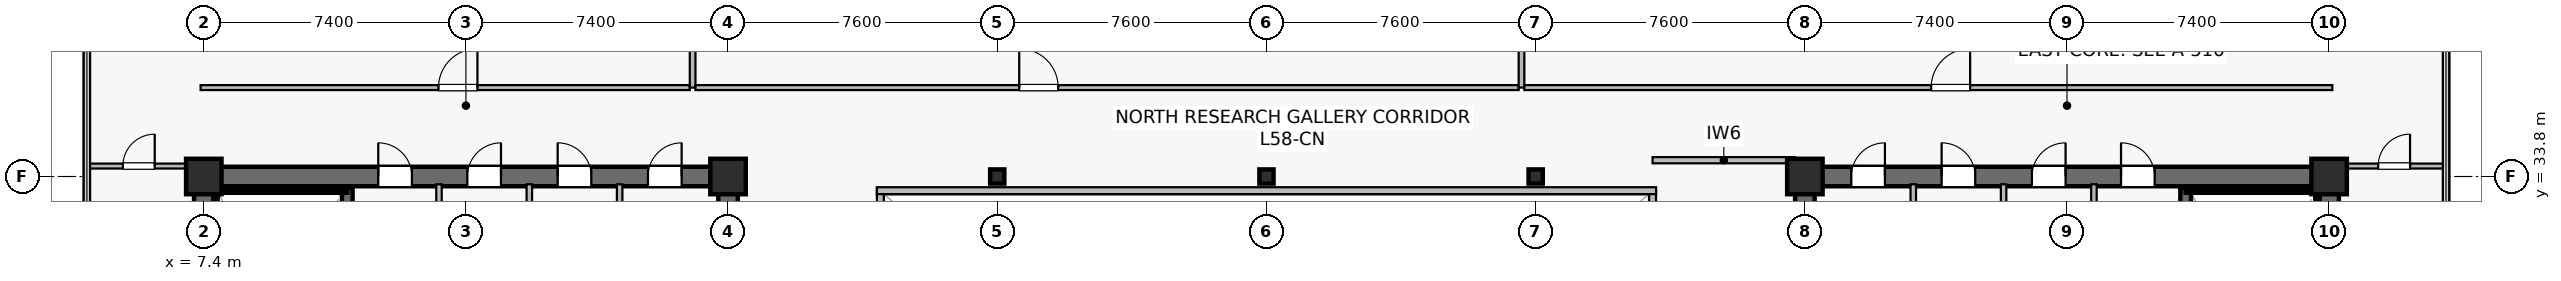
"""IFC4 building model, lengths in metres.
Left out: names, types, materials, properties, quantities, classifications, styles, units other than length and angle.
Written with IfcOpenShell. Run it as: python <this file> out.ifc"""

import sys

from ifc_helpers import new_model, si_unit, direction, frame, frame_2d, origin, origin_2d, place, context, subcontext, project, spatial, rectangle, hollow_rectangle, extrude, source, transform, mapped, element, fill, save


model = new_model("IFC4")
c1 = context("Model", 3, precision=1e-05, world=origin(), true_north=direction((0.0, 1.0)))
c2 = subcontext(c1, "Body", "Model", "MODEL_VIEW")
j1 = project(units=[si_unit("LENGTHUNIT", "METRE"), si_unit("PLANEANGLEUNIT", "RADIAN")], contexts=[c1])
p1 = place(None, origin())
s1 = spatial("IfcSite", under=j1, at=p1, CompositionType="ELEMENT")
p2 = place(p1, origin())
s2 = spatial("IfcBuilding", under=s1, at=p2, CompositionType="ELEMENT")
p3 = place(p2, frame((0.0, 0.0, 242.4)))
s3 = spatial("IfcBuildingStorey", under=s2, at=p3, CompositionType="ELEMENT", Elevation=242.4)
p4 = place(p3, frame((7.125, 33.8, 0.0), z_axis=(0.0, 0.0, 1.0), x_axis=(1.0, 0.0, 0.0)))
e1 = element("IfcWall", 1, at=p4, inside=s3, PredefinedType="SHEAR", context=c2, shape_type="SweptSolid", body=[
    extrude(rectangle(XDim=15.35, YDim=0.55, at=frame_2d((7.675, 0.0))), origin(), (0.0, 0.0, 1.0), 3.8),
])
p5 = place(p4, frame((5.2, 0.0, 0.0)))
e2 = element("IfcOpeningElement", 2, at=p5, cuts=e1, PredefinedType="OPENING", context=c2, shape_type="SweptSolid", body=[
    extrude(rectangle(XDim=0.95, YDim=2.15, at=frame_2d((0.475, 1.075))), frame((0.0, 0.285, 0.0), z_axis=(0.0, -1.0, 0.0), x_axis=(1.0, 0.0, 0.0)), (0.0, 0.0, 1.0), 0.57),
])
p6 = place(p4, frame((7.715, 0.0, 0.0)))
e3 = element("IfcOpeningElement", 3, at=p6, cuts=e1, PredefinedType="OPENING", context=c2, shape_type="SweptSolid", body=[
    extrude(rectangle(XDim=0.95, YDim=2.15, at=frame_2d((0.475, 1.075))), frame((0.0, 0.285, 0.0), z_axis=(0.0, -1.0, 0.0), x_axis=(1.0, 0.0, 0.0)), (0.0, 0.0, 1.0), 0.57),
])
p7 = place(p4, frame((10.265, 0.0, 0.0)))
e4 = element("IfcOpeningElement", 4, at=p7, cuts=e1, PredefinedType="OPENING", context=c2, shape_type="SweptSolid", body=[
    extrude(rectangle(XDim=0.95, YDim=2.15, at=frame_2d((0.475, 1.075))), frame((0.0, 0.285, 0.0), z_axis=(0.0, -1.0, 0.0), x_axis=(1.0, 0.0, 0.0)), (0.0, 0.0, 1.0), 0.57),
])
p8 = place(p4, frame((12.815, 0.0, 0.0)))
e5 = element("IfcOpeningElement", 5, at=p8, cuts=e1, PredefinedType="OPENING", context=c2, shape_type="SweptSolid", body=[
    extrude(rectangle(XDim=0.95, YDim=2.15, at=frame_2d((0.475, 1.075))), frame((0.0, 0.285, 0.0), z_axis=(0.0, -1.0, 0.0), x_axis=(1.0, 0.0, 0.0)), (0.0, 0.0, 1.0), 0.57),
])
p9 = place(p3, frame((7.4, 15.075, 0.0), z_axis=(0.0, 0.0, 1.0), x_axis=(0.0, 1.0, 0.0)))
e6 = element("IfcWall", 6, at=p9, inside=s3, PredefinedType="SHEAR", context=c2, shape_type="SweptSolid", body=[
    extrude(rectangle(XDim=18.45, YDim=0.55, at=frame_2d((9.225, 0.0))), origin(), (0.0, 0.0, 1.0), 3.8),
])
p10 = place(p3, frame((22.2, 15.075, 0.0), z_axis=(0.0, 0.0, 1.0), x_axis=(0.0, 1.0, 0.0)))
e7 = element("IfcWall", 7, at=p10, inside=s3, PredefinedType="SHEAR", context=c2, shape_type="SweptSolid", body=[
    extrude(rectangle(XDim=18.45, YDim=0.55, at=frame_2d((9.225, 0.0))), origin(), (0.0, 0.0, 1.0), 3.8),
])
p11 = place(p10, frame((3.475, 0.0, 0.0)))
e8 = element("IfcOpeningElement", 8, at=p11, cuts=e7, PredefinedType="OPENING", context=c2, shape_type="SweptSolid", body=[
    extrude(rectangle(XDim=1.42, YDim=2.2, at=frame_2d((0.71, 1.1))), frame((0.0, 0.285, 0.0), z_axis=(0.0, -1.0, 0.0), x_axis=(1.0, 0.0, 0.0)), (0.0, 0.0, 1.0), 0.57),
])
p12 = place(p3, frame((11.45, 24.85, 0.0), z_axis=(0.0, 0.0, 1.0), x_axis=(0.0, 1.0, 0.0)))
e9 = element("IfcWall", 9, at=p12, inside=s3, PredefinedType="SHEAR", context=c2, shape_type="SweptSolid", body=[
    extrude(rectangle(XDim=8.63, YDim=0.3, at=frame_2d((4.315, 0.0))), origin(), (0.0, 0.0, 1.0), 3.8),
])
p13 = place(p12, frame((0.42, 0.0, 0.0)))
e10 = element("IfcOpeningElement", 10, at=p13, cuts=e9, PredefinedType="OPENING", context=c2, shape_type="SweptSolid", body=[
    extrude(rectangle(XDim=1.1, YDim=2.15, at=frame_2d((0.55, 1.075))), frame((0.0, 0.16, 0.0), z_axis=(0.0, -1.0, 0.0), x_axis=(1.0, 0.0, 0.0)), (0.0, 0.0, 1.0), 0.32),
])
p14 = place(p3, frame((7.73, 33.4, 0.0), z_axis=(0.0, 0.0, 1.0), x_axis=(1.0, 0.0, 0.0)))
e11 = element("IfcWall", 11, at=p14, inside=s3, PredefinedType="SOLIDWALL", context=c2, shape_type="SweptSolid", body=[
    extrude(rectangle(XDim=3.72, YDim=0.12, at=frame_2d((1.86, 0.0))), origin(), (0.0, 0.0, 1.0), 3.8),
])
p15 = place(p3, frame((7.73, 25.0, 0.0), z_axis=(0.0, 0.0, 1.0), x_axis=(0.0, 1.0, 0.0)))
e12 = element("IfcWall", 12, at=p15, inside=s3, PredefinedType="SOLIDWALL", context=c2, shape_type="SweptSolid", body=[
    extrude(rectangle(XDim=8.32, YDim=0.12, at=frame_2d((4.16, 0.0))), origin(), (0.0, 0.0, 1.0), 3.8),
])
p16 = place(p3, frame((52.325, 33.8, 0.0), z_axis=(0.0, 0.0, 1.0), x_axis=(1.0, 0.0, 0.0)))
e13 = element("IfcWall", 13, at=p16, inside=s3, PredefinedType="SHEAR", context=c2, shape_type="SweptSolid", body=[
    extrude(rectangle(XDim=15.35, YDim=0.55, at=frame_2d((7.675, 0.0))), origin(), (0.0, 0.0, 1.0), 3.8),
])
p17 = place(p16, frame((9.2, 0.0, 0.0)))
e14 = element("IfcOpeningElement", 14, at=p17, cuts=e13, PredefinedType="OPENING", context=c2, shape_type="SweptSolid", body=[
    extrude(rectangle(XDim=0.95, YDim=2.15, at=frame_2d((0.475, 1.075))), frame((0.0, 0.285, 0.0), z_axis=(0.0, -1.0, 0.0), x_axis=(1.0, 0.0, 0.0)), (0.0, 0.0, 1.0), 0.57),
])
p18 = place(p16, frame((6.685, 0.0, 0.0)))
e15 = element("IfcOpeningElement", 15, at=p18, cuts=e13, PredefinedType="OPENING", context=c2, shape_type="SweptSolid", body=[
    extrude(rectangle(XDim=0.95, YDim=2.15, at=frame_2d((0.475, 1.075))), frame((0.0, 0.285, 0.0), z_axis=(0.0, -1.0, 0.0), x_axis=(1.0, 0.0, 0.0)), (0.0, 0.0, 1.0), 0.57),
])
p19 = place(p16, frame((4.135, 0.0, 0.0)))
e16 = element("IfcOpeningElement", 16, at=p19, cuts=e13, PredefinedType="OPENING", context=c2, shape_type="SweptSolid", body=[
    extrude(rectangle(XDim=0.95, YDim=2.15, at=frame_2d((0.475, 1.075))), frame((0.0, 0.285, 0.0), z_axis=(0.0, -1.0, 0.0), x_axis=(1.0, 0.0, 0.0)), (0.0, 0.0, 1.0), 0.57),
])
p20 = place(p16, frame((1.585, 0.0, 0.0)))
e17 = element("IfcOpeningElement", 17, at=p20, cuts=e13, PredefinedType="OPENING", context=c2, shape_type="SweptSolid", body=[
    extrude(rectangle(XDim=0.95, YDim=2.15, at=frame_2d((0.475, 1.075))), frame((0.0, 0.285, 0.0), z_axis=(0.0, -1.0, 0.0), x_axis=(1.0, 0.0, 0.0)), (0.0, 0.0, 1.0), 0.57),
])
p21 = place(p3, frame((52.6, 15.075, 0.0), z_axis=(0.0, 0.0, 1.0), x_axis=(0.0, 1.0, 0.0)))
e18 = element("IfcWall", 18, at=p21, inside=s3, PredefinedType="SHEAR", context=c2, shape_type="SweptSolid", body=[
    extrude(rectangle(XDim=18.45, YDim=0.55, at=frame_2d((9.225, 0.0))), origin(), (0.0, 0.0, 1.0), 3.8),
])
p22 = place(p21, frame((3.475, 0.0, 0.0)))
e19 = element("IfcOpeningElement", 19, at=p22, cuts=e18, PredefinedType="OPENING", context=c2, shape_type="SweptSolid", body=[
    extrude(rectangle(XDim=1.42, YDim=2.2, at=frame_2d((0.71, 1.1))), frame((0.0, 0.285, 0.0), z_axis=(0.0, -1.0, 0.0), x_axis=(1.0, 0.0, 0.0)), (0.0, 0.0, 1.0), 0.57),
])
p23 = place(p3, frame((67.4, 15.075, 0.0), z_axis=(0.0, 0.0, 1.0), x_axis=(0.0, 1.0, 0.0)))
e20 = element("IfcWall", 20, at=p23, inside=s3, PredefinedType="SHEAR", context=c2, shape_type="SweptSolid", body=[
    extrude(rectangle(XDim=18.45, YDim=0.55, at=frame_2d((9.225, 0.0))), origin(), (0.0, 0.0, 1.0), 3.8),
])
p24 = place(p3, frame((63.35, 24.85, 0.0), z_axis=(0.0, 0.0, 1.0), x_axis=(0.0, 1.0, 0.0)))
e21 = element("IfcWall", 21, at=p24, inside=s3, PredefinedType="SHEAR", context=c2, shape_type="SweptSolid", body=[
    extrude(rectangle(XDim=8.63, YDim=0.3, at=frame_2d((4.315, 0.0))), origin(), (0.0, 0.0, 1.0), 3.8),
])
p25 = place(p24, frame((0.42, 0.0, 0.0)))
e22 = element("IfcOpeningElement", 22, at=p25, cuts=e21, PredefinedType="OPENING", context=c2, shape_type="SweptSolid", body=[
    extrude(rectangle(XDim=1.1, YDim=2.15, at=frame_2d((0.55, 1.075))), frame((0.0, 0.16, 0.0), z_axis=(0.0, -1.0, 0.0), x_axis=(1.0, 0.0, 0.0)), (0.0, 0.0, 1.0), 0.32),
])
p26 = place(p3, frame((63.35, 33.4, 0.0), z_axis=(0.0, 0.0, 1.0), x_axis=(1.0, 0.0, 0.0)))
e23 = element("IfcWall", 23, at=p26, inside=s3, PredefinedType="SOLIDWALL", context=c2, shape_type="SweptSolid", body=[
    extrude(rectangle(XDim=3.72, YDim=0.12, at=frame_2d((1.86, 0.0))), origin(), (0.0, 0.0, 1.0), 3.8),
])
p27 = place(p3, frame((67.07, 25.0, 0.0), z_axis=(0.0, 0.0, 1.0), x_axis=(0.0, 1.0, 0.0)))
e24 = element("IfcWall", 24, at=p27, inside=s3, PredefinedType="SOLIDWALL", context=c2, shape_type="SweptSolid", body=[
    extrude(rectangle(XDim=8.32, YDim=0.12, at=frame_2d((4.16, 0.0))), origin(), (0.0, 0.0, 1.0), 3.8),
])
m1 = source(origin(), c2, "Body", "SweptSolid", [
    extrude(rectangle(XDim=1.0, YDim=1.0, at=origin_2d()), origin(), (0.0, 0.0, 1.0), 4.1),
])
for number, where, z_axis, x_axis in (
    (25, (7.4, 33.8, 0.0), (0.0, 0.0, 1.0), (1.0, 0.0, 0.0)),
    (26, (22.2, 33.8, 0.0), (0.0, 0.0, 1.0), (1.0, 0.0, 0.0)),
    (27, (52.6, 33.8, 0.0), (0.0, 0.0, 1.0), (1.0, 0.0, 0.0)),
    (28, (67.4, 33.8, 0.0), (0.0, 0.0, 1.0), (1.0, 0.0, 0.0)),
):
    element("IfcColumn", number, at=place(p3, frame(where, z_axis=z_axis, x_axis=x_axis)), inside=s3, PredefinedType="COLUMN", context=c2, shape_type="MappedRepresentation", body=[
        mapped(m1, transform((0.0, 0.0, 0.0), scale=1.0)),
    ])
m2 = source(origin(), c2, "Body", "SweptSolid", [
    extrude(hollow_rectangle(XDim=0.4, YDim=0.4, WallThickness=0.019, at=origin_2d()), origin(), (0.0, 0.0, 1.0), 4.1),
])
for number, where, z_axis, x_axis in (
    (29, (29.8, 33.8, 0.0), (0.0, 0.0, 1.0), (1.0, 0.0, 0.0)),
    (30, (37.4, 33.8, 0.0), (0.0, 0.0, 1.0), (1.0, 0.0, 0.0)),
    (31, (45.0, 33.8, 0.0), (0.0, 0.0, 1.0), (1.0, 0.0, 0.0)),
):
    element("IfcColumn", number, at=place(p3, frame(where, z_axis=z_axis, x_axis=x_axis)), inside=s3, PredefinedType="COLUMN", context=c2, shape_type="MappedRepresentation", body=[
        mapped(m2, transform((0.0, 0.0, 0.0), scale=1.0)),
    ])
for number, where, z_axis, x_axis in (
    (32, (14.04, 29.65, 0.0), (0.0, 0.0, 1.0), (0.0, 1.0, 0.0)),
    (33, (16.59, 29.65, 0.0), (0.0, 0.0, 1.0), (0.0, 1.0, 0.0)),
    (34, (19.14, 29.65, 0.0), (0.0, 0.0, 1.0), (0.0, 1.0, 0.0)),
    (35, (60.76, 29.65, 0.0), (0.0, 0.0, 1.0), (0.0, 1.0, 0.0)),
    (36, (58.21, 29.65, 0.0), (0.0, 0.0, 1.0), (0.0, 1.0, 0.0)),
    (37, (55.66, 29.65, 0.0), (0.0, 0.0, 1.0), (0.0, 1.0, 0.0)),
):
    element("IfcWall", number, at=place(p3, frame(where, z_axis=z_axis, x_axis=x_axis)), inside=s3, PredefinedType="PLUMBINGWALL", context=c2, shape_type="SweptSolid", body=[
        extrude(rectangle(XDim=3.93, YDim=0.155, at=frame_2d((1.965, 0.0))), origin(), (0.0, 0.0, 1.0), 3.8),
    ])
p28 = place(p3, frame((48.3, 34.26, 0.0), z_axis=(0.0, 0.0, 1.0), x_axis=(1.0, 0.0, 0.0)))
e38 = element("IfcWall", 38, at=p28, inside=s3, PredefinedType="PARTITIONING", context=c2, shape_type="SweptSolid", body=[
    extrude(rectangle(XDim=4.025, YDim=0.175, at=frame_2d((2.012, 0.0))), origin(), (0.0, 0.0, 1.0), 3.485),
])
p29 = place(p3, frame((26.5, 15.2, 0.0), z_axis=(0.0, 0.0, 1.0), x_axis=(0.0, 1.0, 0.0)))
e39 = element("IfcWall", 39, at=p29, inside=s3, PredefinedType="SOLIDWALL", context=c2, shape_type="SweptSolid", body=[
    extrude(rectangle(XDim=18.2, YDim=0.195, at=frame_2d((9.1, 0.0))), origin(), (0.0, 0.0, 1.0), 3.8),
])
p30 = place(p29, frame((1.8, 0.0, 0.9)))
e40 = element("IfcOpeningElement", 40, at=p30, cuts=e39, PredefinedType="OPENING", context=c2, shape_type="SweptSolid", body=[
    extrude(rectangle(XDim=1.5, YDim=1.4, at=frame_2d((0.75, 0.7))), frame((0.0, 0.107, 0.0), z_axis=(0.0, -1.0, 0.0), x_axis=(1.0, 0.0, 0.0)), (0.0, 0.0, 1.0), 0.215),
])
p31 = place(p29, frame((13.2, 0.0, 0.9)))
e41 = element("IfcOpeningElement", 41, at=p31, cuts=e39, PredefinedType="OPENING", context=c2, shape_type="SweptSolid", body=[
    extrude(rectangle(XDim=1.5, YDim=1.4, at=frame_2d((0.75, 0.7))), frame((0.0, 0.107, 0.0), z_axis=(0.0, -1.0, 0.0), x_axis=(1.0, 0.0, 0.0)), (0.0, 0.0, 1.0), 0.215),
])
p32 = place(p3, frame((48.3, 15.2, 0.0), z_axis=(0.0, 0.0, 1.0), x_axis=(0.0, 1.0, 0.0)))
e42 = element("IfcWall", 42, at=p32, inside=s3, PredefinedType="SOLIDWALL", context=c2, shape_type="SweptSolid", body=[
    extrude(rectangle(XDim=18.2, YDim=0.195, at=frame_2d((9.1, 0.0))), origin(), (0.0, 0.0, 1.0), 3.8),
])
p33 = place(p32, frame((1.8, 0.0, 0.9)))
e43 = element("IfcOpeningElement", 43, at=p33, cuts=e42, PredefinedType="OPENING", context=c2, shape_type="SweptSolid", body=[
    extrude(rectangle(XDim=1.5, YDim=1.4, at=frame_2d((0.75, 0.7))), frame((0.0, 0.107, 0.0), z_axis=(0.0, -1.0, 0.0), x_axis=(1.0, 0.0, 0.0)), (0.0, 0.0, 1.0), 0.215),
])
p34 = place(p32, frame((13.2, 0.0, 0.9)))
e44 = element("IfcOpeningElement", 44, at=p34, cuts=e42, PredefinedType="OPENING", context=c2, shape_type="SweptSolid", body=[
    extrude(rectangle(XDim=1.5, YDim=1.4, at=frame_2d((0.75, 0.7))), frame((0.0, 0.107, 0.0), z_axis=(0.0, -1.0, 0.0), x_axis=(1.0, 0.0, 0.0)), (0.0, 0.0, 1.0), 0.215),
])
p35 = place(p3, frame((26.4, 33.4, 0.0), z_axis=(0.0, 0.0, 1.0), x_axis=(1.0, 0.0, 0.0)))
e45 = element("IfcWall", 45, at=p35, inside=s3, PredefinedType="SOLIDWALL", context=c2, shape_type="SweptSolid", body=[
    extrude(rectangle(XDim=22.0, YDim=0.195, at=frame_2d((11.0, 0.0))), origin(), (0.0, 0.0, 1.0), 3.8),
])
p36 = place(p3, frame((7.31, 36.31, 0.0), z_axis=(0.0, 0.0, 1.0), x_axis=(1.0, 0.0, 0.0)))
e46 = element("IfcWall", 46, at=p36, inside=s3, PredefinedType="PARTITIONING", context=c2, shape_type="SweptSolid", body=[
    extrude(rectangle(XDim=13.81, YDim=0.14, at=frame_2d((6.905, 0.0))), origin(), (0.0, 0.0, 1.0), 3.197),
])
p37 = place(p36, frame((6.715, 0.0, 0.0)))
e47 = element("IfcOpeningElement", 47, at=p37, cuts=e46, PredefinedType="OPENING", context=c2, shape_type="SweptSolid", body=[
    extrude(rectangle(XDim=1.1, YDim=2.18, at=frame_2d((0.55, 1.09))), frame((0.0, 0.08, 0.0), z_axis=(0.0, -1.0, 0.0), x_axis=(1.0, 0.0, 0.0)), (0.0, 0.0, 1.0), 0.16),
])
p38 = place(p3, frame((21.2, 36.31, 0.0), z_axis=(0.0, 0.0, 1.0), x_axis=(0.0, 1.0, 0.0)))
e48 = element("IfcWall", 48, at=p38, inside=s3, PredefinedType="PARTITIONING", context=c2, shape_type="SweptSolid", body=[
    extrude(rectangle(XDim=9.58, YDim=0.16, at=frame_2d((4.79, 0.0))), origin(), (0.0, 0.0, 1.0), 3.135),
])
p39 = place(p3, frame((21.28, 36.31, 0.0), z_axis=(0.0, 0.0, 1.0), x_axis=(1.0, 0.0, 0.0)))
e49 = element("IfcWall", 49, at=p39, inside=s3, PredefinedType="PARTITIONING", context=c2, shape_type="SweptSolid", body=[
    extrude(rectangle(XDim=23.24, YDim=0.14, at=frame_2d((11.62, 0.0))), origin(), (0.0, 0.0, 1.0), 3.197),
])
p40 = place(p39, frame((9.14, 0.0, 0.0)))
e50 = element("IfcOpeningElement", 50, at=p40, cuts=e49, PredefinedType="OPENING", context=c2, shape_type="SweptSolid", body=[
    extrude(rectangle(XDim=1.1, YDim=2.18, at=frame_2d((0.55, 1.09))), frame((0.0, 0.08, 0.0), z_axis=(0.0, -1.0, 0.0), x_axis=(1.0, 0.0, 0.0)), (0.0, 0.0, 1.0), 0.16),
])
p41 = place(p3, frame((44.6, 36.31, 0.0), z_axis=(0.0, 0.0, 1.0), x_axis=(0.0, 1.0, 0.0)))
e51 = element("IfcWall", 51, at=p41, inside=s3, PredefinedType="PARTITIONING", context=c2, shape_type="SweptSolid", body=[
    extrude(rectangle(XDim=8.38, YDim=0.16, at=frame_2d((4.19, 0.0))), origin(), (0.0, 0.0, 1.0), 3.135),
])
p42 = place(p3, frame((44.68, 36.31, 0.0), z_axis=(0.0, 0.0, 1.0), x_axis=(1.0, 0.0, 0.0)))
e52 = element("IfcWall", 52, at=p42, inside=s3, PredefinedType="PARTITIONING", context=c2, shape_type="SweptSolid", body=[
    extrude(rectangle(XDim=22.81, YDim=0.14, at=frame_2d((11.405, 0.0))), origin(), (0.0, 0.0, 1.0), 3.197),
])
p43 = place(p42, frame((11.485, 0.0, 0.0)))
e53 = element("IfcOpeningElement", 53, at=p43, cuts=e52, PredefinedType="OPENING", context=c2, shape_type="SweptSolid", body=[
    extrude(rectangle(XDim=1.1, YDim=2.18, at=frame_2d((0.55, 1.09))), frame((0.0, 0.08, 0.0), z_axis=(0.0, -1.0, 0.0), x_axis=(1.0, 0.0, 0.0)), (0.0, 0.0, 1.0), 0.16),
])
p44 = place(p3, frame((4.11, 34.095, 0.0), z_axis=(0.0, 0.0, 1.0), x_axis=(1.0, 0.0, 0.0)))
e54 = element("IfcWall", 54, at=p44, inside=s3, PredefinedType="PARTITIONING", context=c2, shape_type="SweptSolid", body=[
    extrude(rectangle(XDim=2.91, YDim=0.14, at=frame_2d((1.455, 0.0))), origin(), (0.0, 0.0, 1.0), 3.8),
])
p45 = place(p44, frame((1.005, 0.0, 0.0)))
e55 = element("IfcOpeningElement", 55, at=p45, cuts=e54, PredefinedType="OPENING", context=c2, shape_type="SweptSolid", body=[
    extrude(rectangle(XDim=0.9, YDim=2.1, at=frame_2d((0.45, 1.05))), frame((0.0, 0.08, 0.0), z_axis=(0.0, -1.0, 0.0), x_axis=(1.0, 0.0, 0.0)), (0.0, 0.0, 1.0), 0.16),
])
p46 = place(p3, frame((67.78, 34.095, 0.0), z_axis=(0.0, 0.0, 1.0), x_axis=(1.0, 0.0, 0.0)))
e56 = element("IfcWall", 56, at=p46, inside=s3, PredefinedType="PARTITIONING", context=c2, shape_type="SweptSolid", body=[
    extrude(rectangle(XDim=2.91, YDim=0.14, at=frame_2d((1.455, 0.0))), origin(), (0.0, 0.0, 1.0), 3.8),
])
p47 = place(p46, frame((1.005, 0.0, 0.0)))
e57 = element("IfcOpeningElement", 57, at=p47, cuts=e56, PredefinedType="OPENING", context=c2, shape_type="SweptSolid", body=[
    extrude(rectangle(XDim=0.9, YDim=2.1, at=frame_2d((0.45, 1.05))), frame((0.0, 0.08, 0.0), z_axis=(0.0, -1.0, 0.0), x_axis=(1.0, 0.0, 0.0)), (0.0, 0.0, 1.0), 0.16),
])
m3 = source(origin(), c2, "Body", "SweptSolid", [
    extrude(rectangle(XDim=0.95, YDim=2.15, at=frame_2d((0.475, 1.075))), frame((0.0, 0.025, 0.0), z_axis=(0.0, -1.0, 0.0), x_axis=(1.0, 0.0, 0.0)), (0.0, 0.0, 1.0), 0.05),
])
p48 = place(p5, origin())
e58 = element("IfcDoor", 58, at=p48, inside=s3, OperationType="SINGLE_SWING_LEFT", PredefinedType="DOOR", context=c2, shape_type="MappedRepresentation", body=[
    mapped(m3, transform((0.0, 0.0, 0.0), scale=1.0)),
])
fill(e2, e58)
p49 = place(p6, origin())
e59 = element("IfcDoor", 59, at=p49, inside=s3, OperationType="SINGLE_SWING_RIGHT", PredefinedType="DOOR", context=c2, shape_type="MappedRepresentation", body=[
    mapped(m3, transform((0.0, 0.0, 0.0), scale=1.0)),
])
fill(e3, e59)
p50 = place(p7, origin())
e60 = element("IfcDoor", 60, at=p50, inside=s3, OperationType="SINGLE_SWING_LEFT", PredefinedType="DOOR", context=c2, shape_type="MappedRepresentation", body=[
    mapped(m3, transform((0.0, 0.0, 0.0), scale=1.0)),
])
fill(e4, e60)
p51 = place(p8, origin())
e61 = element("IfcDoor", 61, at=p51, inside=s3, OperationType="SINGLE_SWING_RIGHT", PredefinedType="DOOR", context=c2, shape_type="MappedRepresentation", body=[
    mapped(m3, transform((0.0, 0.0, 0.0), scale=1.0)),
])
fill(e5, e61)
p52 = place(p17, origin())
e62 = element("IfcDoor", 62, at=p52, inside=s3, OperationType="SINGLE_SWING_LEFT", PredefinedType="DOOR", context=c2, shape_type="MappedRepresentation", body=[
    mapped(m3, transform((0.0, 0.0, 0.0), scale=1.0)),
])
fill(e14, e62)
p53 = place(p18, origin())
e63 = element("IfcDoor", 63, at=p53, inside=s3, OperationType="SINGLE_SWING_RIGHT", PredefinedType="DOOR", context=c2, shape_type="MappedRepresentation", body=[
    mapped(m3, transform((0.0, 0.0, 0.0), scale=1.0)),
])
fill(e15, e63)
p54 = place(p19, origin())
e64 = element("IfcDoor", 64, at=p54, inside=s3, OperationType="SINGLE_SWING_LEFT", PredefinedType="DOOR", context=c2, shape_type="MappedRepresentation", body=[
    mapped(m3, transform((0.0, 0.0, 0.0), scale=1.0)),
])
fill(e16, e64)
p55 = place(p20, origin())
e65 = element("IfcDoor", 65, at=p55, inside=s3, OperationType="SINGLE_SWING_RIGHT", PredefinedType="DOOR", context=c2, shape_type="MappedRepresentation", body=[
    mapped(m3, transform((0.0, 0.0, 0.0), scale=1.0)),
])
fill(e17, e65)
m4 = source(origin(), c2, "Body", "SweptSolid", [
    extrude(rectangle(XDim=1.1, YDim=2.18, at=frame_2d((0.55, 1.09))), frame((0.0, 0.025, 0.0), z_axis=(0.0, -1.0, 0.0), x_axis=(1.0, 0.0, 0.0)), (0.0, 0.0, 1.0), 0.05),
])
p56 = place(p37, origin())
e66 = element("IfcDoor", 66, at=p56, inside=s3, OperationType="SINGLE_SWING_RIGHT", PredefinedType="DOOR", context=c2, shape_type="MappedRepresentation", body=[
    mapped(m4, transform((0.0, 0.0, 0.0), scale=1.0)),
])
fill(e47, e66)
p57 = place(p40, origin())
e67 = element("IfcDoor", 67, at=p57, inside=s3, OperationType="SINGLE_SWING_LEFT", PredefinedType="DOOR", context=c2, shape_type="MappedRepresentation", body=[
    mapped(m4, transform((0.0, 0.0, 0.0), scale=1.0)),
])
fill(e50, e67)
p58 = place(p43, origin())
e68 = element("IfcDoor", 68, at=p58, inside=s3, OperationType="SINGLE_SWING_RIGHT", PredefinedType="DOOR", context=c2, shape_type="MappedRepresentation", body=[
    mapped(m4, transform((0.0, 0.0, 0.0), scale=1.0)),
])
fill(e53, e68)
m5 = source(origin(), c2, "Body", "SweptSolid", [
    extrude(rectangle(XDim=0.9, YDim=2.1, at=frame_2d((0.45, 1.05))), frame((0.0, 0.025, 0.0), z_axis=(0.0, -1.0, 0.0), x_axis=(1.0, 0.0, 0.0)), (0.0, 0.0, 1.0), 0.05),
])
p59 = place(p45, origin())
e69 = element("IfcDoor", 69, at=p59, inside=s3, OperationType="SINGLE_SWING_RIGHT", PredefinedType="DOOR", context=c2, shape_type="MappedRepresentation", body=[
    mapped(m5, transform((0.0, 0.0, 0.0), scale=1.0)),
])
fill(e55, e69)
p60 = place(p47, origin())
e70 = element("IfcDoor", 70, at=p60, inside=s3, OperationType="SINGLE_SWING_RIGHT", PredefinedType="DOOR", context=c2, shape_type="MappedRepresentation", body=[
    mapped(m5, transform((0.0, 0.0, 0.0), scale=1.0)),
])
fill(e57, e70)
save(model, sys.argv[1])
